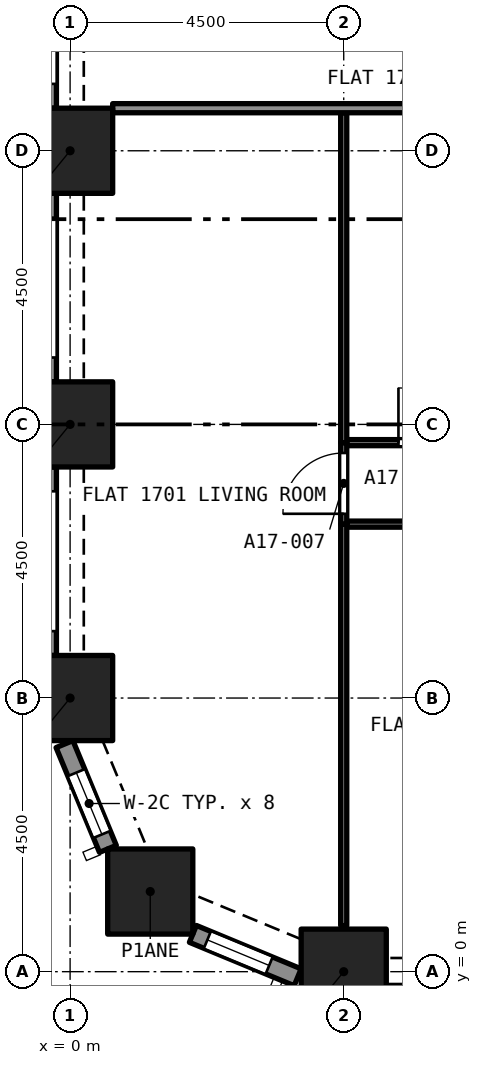
"""IFC4 building model, lengths in metres.
Left out: names, types, materials, properties, quantities, classifications, styles, units other than length and angle.
Written with IfcOpenShell. Run it as: python <this file> out.ifc"""

import sys

from ifc_helpers import new_model, si_unit, direction, frame, frame_2d, origin, origin_2d, place, context, subcontext, project, spatial, rectangle, extrude, element, fill, save


model = new_model("IFC4")
c1 = context("Model", 3, precision=1e-05, world=origin(), true_north=direction((0.0, 1.0)))
c2 = subcontext(c1, "Body", "Model", "MODEL_VIEW")
j1 = project(units=[si_unit("LENGTHUNIT", "METRE"), si_unit("PLANEANGLEUNIT", "RADIAN")], contexts=[c1])
p1 = place(None, origin())
s1 = spatial("IfcSite", under=j1, at=p1, CompositionType="ELEMENT")
p2 = place(p1, origin())
s2 = spatial("IfcBuilding", under=s1, at=p2, CompositionType="ELEMENT")
p3 = place(p2, frame((0.0, 0.0, 65.6)))
s3 = spatial("IfcBuildingStorey", under=s2, at=p3, CompositionType="ELEMENT", Elevation=65.6)
for number, where, z_axis, x_axis in (
    (1, (4.5, 0.0, 0.0), (0.0, 0.0, 1.0), (1.0, 0.0, 0.0)),
    (2, (1.318, 1.318, 0.0), (0.0, 0.0, 1.0), (1.0, 0.0, 0.0)),
    (3, (0.0, 4.5, 0.0), (0.0, 0.0, 1.0), (1.0, 0.0, 0.0)),
    (4, (0.0, 9.0, 0.0), (0.0, 0.0, 1.0), (1.0, 0.0, 0.0)),
    (5, (0.0, 13.5, 0.0), (0.0, 0.0, 1.0), (1.0, 0.0, 0.0)),
):
    element("IfcColumn", number, at=place(p3, frame(where, z_axis=z_axis, x_axis=x_axis)), inside=s3, PredefinedType="COLUMN", context=c2, shape_type="SweptSolid", body=[
        extrude(rectangle(XDim=1.4, YDim=1.4, at=origin_2d()), origin(), (0.0, 0.0, 1.0), 3.2),
    ])
p4 = place(p3, frame((0.622, 2.02, 0.0), z_axis=(0.0, 0.0, 1.0), x_axis=(-0.38262540684, 0.923903565336, 0.0)))
e6 = element("IfcWall", 6, at=p4, inside=s3, PredefinedType="SOLIDWALL", context=c2, shape_type="SweptSolid", body=[
    extrude(rectangle(XDim=1.865, YDim=0.3, at=frame_2d((0.933, 0.0))), origin(), (0.0, 0.0, 1.0), 3.2),
])
p5 = place(p4, frame((0.258, 0.0, 0.45)))
e7 = element("IfcOpeningElement", 7, at=p5, cuts=e6, PredefinedType="OPENING", context=c2, shape_type="SweptSolid", body=[
    extrude(rectangle(XDim=1.1, YDim=1.95, at=frame_2d((0.55, 0.975))), frame((0.0, 0.16, 0.0), z_axis=(0.0, -1.0, 0.0), x_axis=(1.0, 0.0, 0.0)), (0.0, 0.0, 1.0), 0.32),
])
p6 = place(p3, frame((3.743, -0.092, 0.0), z_axis=(0.0, 0.0, 1.0), x_axis=(-0.923857286003, 0.382737135771, 0.0)))
e8 = element("IfcWall", 8, at=p6, inside=s3, PredefinedType="SOLIDWALL", context=c2, shape_type="SweptSolid", body=[
    extrude(rectangle(XDim=1.865, YDim=0.3, at=frame_2d((0.933, 0.0))), origin(), (0.0, 0.0, 1.0), 3.2),
])
p7 = place(p6, frame((0.508, 0.0, 0.45)))
e9 = element("IfcOpeningElement", 9, at=p7, cuts=e8, PredefinedType="OPENING", context=c2, shape_type="SweptSolid", body=[
    extrude(rectangle(XDim=1.1, YDim=1.95, at=frame_2d((0.55, 0.975))), frame((0.0, 0.16, 0.0), z_axis=(0.0, -1.0, 0.0), x_axis=(1.0, 0.0, 0.0)), (0.0, 0.0, 1.0), 0.32),
])
p8 = place(p3, frame((-0.375, 14.2, 0.0), z_axis=(0.0, 0.0, 1.0), x_axis=(0.0, 1.0, 0.0)))
e10 = element("IfcWall", 10, at=p8, inside=s3, PredefinedType="SOLIDWALL", context=c2, shape_type="SweptSolid", body=[
    extrude(rectangle(XDim=3.1, YDim=0.3, at=frame_2d((1.55, 0.0))), origin(), (0.0, 0.0, 1.0), 3.2),
])
p9 = place(p8, frame((0.4, 0.0, 0.45)))
e11 = element("IfcOpeningElement", 11, at=p9, cuts=e10, PredefinedType="OPENING", context=c2, shape_type="SweptSolid", body=[
    extrude(rectangle(XDim=2.3, YDim=1.95, at=frame_2d((1.15, 0.975))), frame((0.0, 0.16, 0.0), z_axis=(0.0, -1.0, 0.0), x_axis=(1.0, 0.0, 0.0)), (0.0, 0.0, 1.0), 0.32),
])
p10 = place(p3, frame((-0.375, 9.7, 0.0), z_axis=(0.0, 0.0, 1.0), x_axis=(0.0, 1.0, 0.0)))
e12 = element("IfcWall", 12, at=p10, inside=s3, PredefinedType="SOLIDWALL", context=c2, shape_type="SweptSolid", body=[
    extrude(rectangle(XDim=3.1, YDim=0.3, at=frame_2d((1.55, 0.0))), origin(), (0.0, 0.0, 1.0), 3.2),
])
p11 = place(p10, frame((0.4, 0.0, 0.45)))
e13 = element("IfcOpeningElement", 13, at=p11, cuts=e12, PredefinedType="OPENING", context=c2, shape_type="SweptSolid", body=[
    extrude(rectangle(XDim=2.3, YDim=1.95, at=frame_2d((1.15, 0.975))), frame((0.0, 0.16, 0.0), z_axis=(0.0, -1.0, 0.0), x_axis=(1.0, 0.0, 0.0)), (0.0, 0.0, 1.0), 0.32),
])
p12 = place(p3, frame((-0.375, 5.2, 0.0), z_axis=(0.0, 0.0, 1.0), x_axis=(0.0, 1.0, 0.0)))
e14 = element("IfcWall", 14, at=p12, inside=s3, PredefinedType="SOLIDWALL", context=c2, shape_type="SweptSolid", body=[
    extrude(rectangle(XDim=3.1, YDim=0.3, at=frame_2d((1.55, 0.0))), origin(), (0.0, 0.0, 1.0), 3.2),
])
p13 = place(p12, frame((0.4, 0.0, 0.45)))
e15 = element("IfcOpeningElement", 15, at=p13, cuts=e14, PredefinedType="OPENING", context=c2, shape_type="SweptSolid", body=[
    extrude(rectangle(XDim=2.3, YDim=1.95, at=frame_2d((1.15, 0.975))), frame((0.0, 0.16, 0.0), z_axis=(0.0, -1.0, 0.0), x_axis=(1.0, 0.0, 0.0)), (0.0, 0.0, 1.0), 0.32),
])
p14 = place(p3, frame((9.0, 7.36, 0.0), z_axis=(0.0, 0.0, 1.0), x_axis=(-1.0, 0.0, 0.0)))
e16 = element("IfcWall", 16, at=p14, inside=s3, PredefinedType="PARTITIONING", context=c2, shape_type="SweptSolid", body=[
    extrude(rectangle(XDim=4.45, YDim=0.1, at=frame_2d((2.225, 0.0))), origin(), (0.0, 0.0, 1.0), 2.9),
])
p15 = place(p14, frame((1.8, 0.0, 0.0)))
e17 = element("IfcOpeningElement", 17, at=p15, cuts=e16, PredefinedType="OPENING", context=c2, shape_type="SweptSolid", body=[
    extrude(rectangle(XDim=0.9, YDim=2.1, at=frame_2d((0.45, 1.05))), frame((0.0, 0.06, 0.0), z_axis=(0.0, -1.0, 0.0), x_axis=(1.0, 0.0, 0.0)), (0.0, 0.0, 1.0), 0.12),
])
p16 = place(p3, frame((4.5, 0.758, 0.0), z_axis=(0.0, 0.0, 1.0), x_axis=(0.0, 1.0, 0.0)))
e18 = element("IfcWall", 18, at=p16, inside=s3, PredefinedType="PARTITIONING", context=c2, shape_type="SweptSolid", body=[
    extrude(rectangle(XDim=6.603, YDim=0.1, at=frame_2d((3.301, 0.0))), origin(), (0.0, 0.0, 1.0), 2.9),
])
p17 = place(p3, frame((4.55, 8.7, 0.0), z_axis=(0.0, 0.0, 1.0), x_axis=(1.0, 0.0, 0.0)))
e19 = element("IfcWall", 19, at=p17, inside=s3, PredefinedType="PARTITIONING", context=c2, shape_type="SweptSolid", body=[
    extrude(rectangle(XDim=2.7, YDim=0.1, at=frame_2d((1.35, 0.0))), origin(), (0.0, 0.0, 1.0), 2.9),
])
p18 = place(p17, frame((0.85, 0.0, 0.0)))
e20 = element("IfcOpeningElement", 20, at=p18, cuts=e19, PredefinedType="OPENING", context=c2, shape_type="SweptSolid", body=[
    extrude(rectangle(XDim=0.9, YDim=2.1, at=frame_2d((0.45, 1.05))), frame((0.0, 0.06, 0.0), z_axis=(0.0, -1.0, 0.0), x_axis=(1.0, 0.0, 0.0)), (0.0, 0.0, 1.0), 0.12),
])
p19 = place(p3, frame((4.5, 7.36, 0.0), z_axis=(0.0, 0.0, 1.0), x_axis=(0.0, 1.0, 0.0)))
e21 = element("IfcWall", 21, at=p19, inside=s3, PredefinedType="PARTITIONING", context=c2, shape_type="SweptSolid", body=[
    extrude(rectangle(XDim=1.34, YDim=0.1, at=frame_2d((0.67, 0.0))), origin(), (0.0, 0.0, 1.0), 2.9),
])
p20 = place(p19, frame((0.17, 0.0, 0.0)))
e22 = element("IfcOpeningElement", 22, at=p20, cuts=e21, PredefinedType="OPENING", context=c2, shape_type="SweptSolid", body=[
    extrude(rectangle(XDim=1.0, YDim=2.1, at=frame_2d((0.5, 1.05))), frame((0.0, 0.06, 0.0), z_axis=(0.0, -1.0, 0.0), x_axis=(1.0, 0.0, 0.0)), (0.0, 0.0, 1.0), 0.12),
])
p21 = place(p3, frame((4.5, 8.7, 0.0), z_axis=(0.0, 0.0, 1.0), x_axis=(0.0, 1.0, 0.0)))
e23 = element("IfcWall", 23, at=p21, inside=s3, PredefinedType="PARTITIONING", context=c2, shape_type="SweptSolid", body=[
    extrude(rectangle(XDim=5.425, YDim=0.1, at=frame_2d((2.712, 0.0))), origin(), (0.0, 0.0, 1.0), 2.9),
])
p22 = place(p3, frame((0.7, 14.2, 0.0), z_axis=(0.0, 0.0, 1.0), x_axis=(1.0, 0.0, 0.0)))
e24 = element("IfcWall", 24, at=p22, inside=s3, PredefinedType="PARTITIONING", context=c2, shape_type="SweptSolid", body=[
    extrude(rectangle(XDim=6.5, YDim=0.15, at=frame_2d((3.25, 0.0))), origin(), (0.0, 0.0, 1.0), 2.9),
])
p23 = place(p5, origin())
e25 = element("IfcWindow", 25, at=p23, inside=s3, PartitioningType="SINGLE_PANEL", PredefinedType="WINDOW", context=c2, shape_type="SweptSolid", body=[
    extrude(rectangle(XDim=1.1, YDim=1.95, at=frame_2d((0.55, 0.975))), frame((0.0, 0.03, 0.0), z_axis=(0.0, -1.0, 0.0), x_axis=(1.0, 0.0, 0.0)), (0.0, 0.0, 1.0), 0.06),
])
fill(e7, e25)
p24 = place(p7, origin())
e26 = element("IfcWindow", 26, at=p24, inside=s3, PartitioningType="SINGLE_PANEL", PredefinedType="WINDOW", context=c2, shape_type="SweptSolid", body=[
    extrude(rectangle(XDim=1.1, YDim=1.95, at=frame_2d((0.55, 0.975))), frame((0.0, 0.03, 0.0), z_axis=(0.0, -1.0, 0.0), x_axis=(1.0, 0.0, 0.0)), (0.0, 0.0, 1.0), 0.06),
])
fill(e9, e26)
p25 = place(p18, origin())
e27 = element("IfcDoor", 27, at=p25, inside=s3, OperationType="SINGLE_SWING_LEFT", PredefinedType="DOOR", context=c2, shape_type="SweptSolid", body=[
    extrude(rectangle(XDim=0.9, YDim=2.1, at=frame_2d((0.45, 1.05))), frame((0.0, 0.025, 0.0), z_axis=(0.0, -1.0, 0.0), x_axis=(1.0, 0.0, 0.0)), (0.0, 0.0, 1.0), 0.05),
])
fill(e20, e27)
p26 = place(p20, origin())
e28 = element("IfcDoor", 28, at=p26, inside=s3, OperationType="SINGLE_SWING_LEFT", PredefinedType="DOOR", context=c2, shape_type="SweptSolid", body=[
    extrude(rectangle(XDim=1.0, YDim=2.1, at=frame_2d((0.5, 1.05))), frame((0.0, 0.025, 0.0), z_axis=(0.0, -1.0, 0.0), x_axis=(1.0, 0.0, 0.0)), (0.0, 0.0, 1.0), 0.05),
])
fill(e22, e28)
save(model, sys.argv[1])
